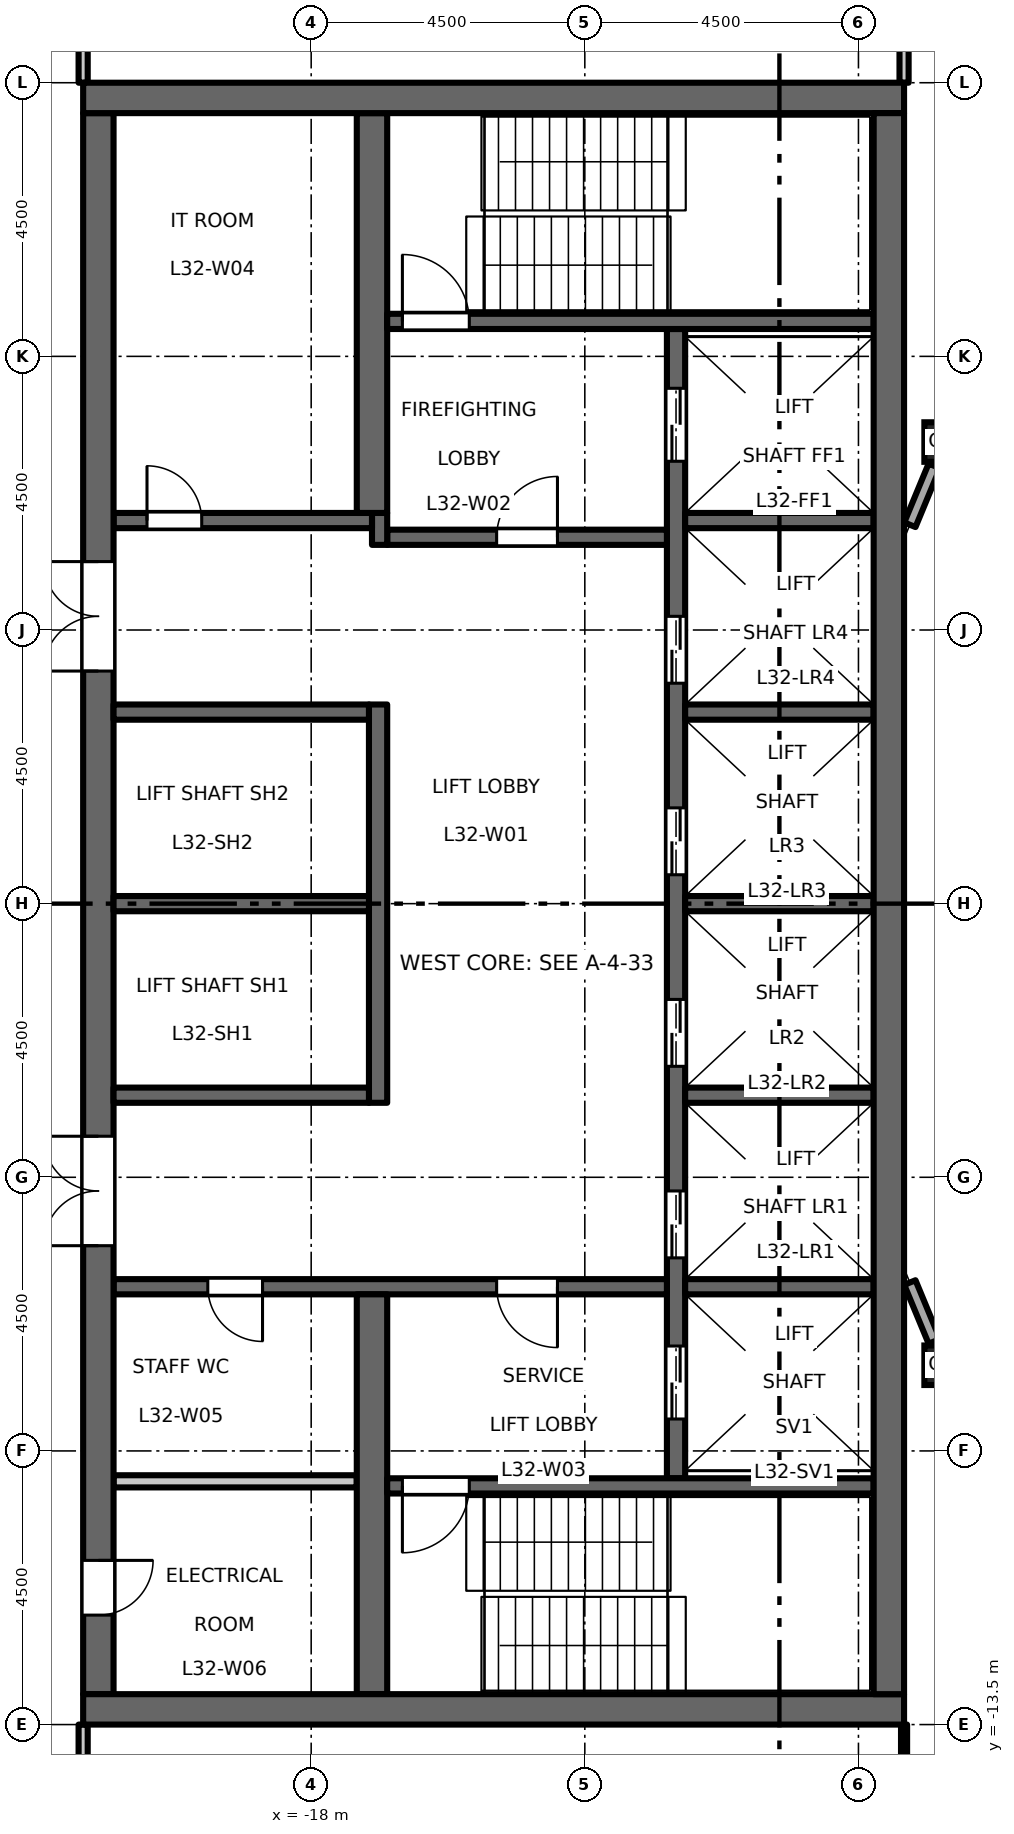
"""IFC4 building model, lengths in metres.
Left out: names, types, materials, properties, quantities, classifications, styles, units other than length and angle.
Written with IfcOpenShell. Run it as: python <this file> out.ifc"""

import sys

from ifc_helpers import new_model, si_unit, direction, frame, frame_2d, origin, origin_2d, place, context, subcontext, project, spatial, rectangle, hollow_rectangle, extrude, element, fill, save


model = new_model("IFC4")
c1 = context("Model", 3, precision=1e-05, world=origin(), true_north=direction((0.0, 1.0)))
c2 = subcontext(c1, "Body", "Model", "MODEL_VIEW")
j1 = project(units=[si_unit("LENGTHUNIT", "METRE"), si_unit("PLANEANGLEUNIT", "RADIAN")], contexts=[c1])
p1 = place(None, origin())
s1 = spatial("IfcSite", under=j1, at=p1, CompositionType="ELEMENT")
p2 = place(p1, origin())
s2 = spatial("IfcBuilding", under=s1, at=p2, CompositionType="ELEMENT")
p3 = place(p2, frame((0.0, 0.0, 149.7)))
s3 = spatial("IfcBuildingStorey", under=s2, at=p3, CompositionType="ELEMENT", Elevation=149.7)
for number, where, z_axis, x_axis in (
    (1, (-7.591, -7.591, 0.0), (0.0, 0.0, 1.0), (1.0, 0.0, 0.0)),
    (2, (-7.591, 7.591, 0.0), (0.0, 0.0, 1.0), (1.0, 0.0, 0.0)),
):
    element("IfcColumn", number, at=place(p3, frame(where, z_axis=z_axis, x_axis=x_axis)), inside=s3, PredefinedType="COLUMN", context=c2, shape_type="SweptSolid", body=[
        extrude(hollow_rectangle(XDim=0.65, YDim=0.65, WallThickness=0.036, at=origin_2d()), origin(), (0.0, 0.0, 1.0), 4.5),
    ])
p4 = place(p3, frame((-12.0, -9.45, 0.0), z_axis=(0.0, 0.0, 1.0), x_axis=(0.0, 1.0, 0.0)))
e3 = element("IfcWall", 3, at=p4, inside=s3, PredefinedType="SHEAR", context=c2, shape_type="SweptSolid", body=[
    extrude(rectangle(XDim=18.9, YDim=0.3, at=frame_2d((9.45, 0.0))), origin(), (0.0, 0.0, 1.0), 4.35),
])
p5 = place(p4, frame((3.625, 0.0, 0.0)))
e4 = element("IfcOpeningElement", 4, at=p5, cuts=e3, PredefinedType="OPENING", context=c2, shape_type="SweptSolid", body=[
    extrude(rectangle(XDim=1.1, YDim=2.1, at=frame_2d((0.55, 1.05))), frame((0.0, 0.16, 0.0), z_axis=(0.0, -1.0, 0.0), x_axis=(1.0, 0.0, 0.0)), (0.0, 0.0, 1.0), 0.32),
])
p6 = place(p4, frame((6.775, 0.0, 0.0)))
e5 = element("IfcOpeningElement", 5, at=p6, cuts=e3, PredefinedType="OPENING", context=c2, shape_type="SweptSolid", body=[
    extrude(rectangle(XDim=1.1, YDim=2.1, at=frame_2d((0.55, 1.05))), frame((0.0, 0.16, 0.0), z_axis=(0.0, -1.0, 0.0), x_axis=(1.0, 0.0, 0.0)), (0.0, 0.0, 1.0), 0.32),
])
p7 = place(p4, frame((9.925, 0.0, 0.0)))
e6 = element("IfcOpeningElement", 6, at=p7, cuts=e3, PredefinedType="OPENING", context=c2, shape_type="SweptSolid", body=[
    extrude(rectangle(XDim=1.1, YDim=2.1, at=frame_2d((0.55, 1.05))), frame((0.0, 0.16, 0.0), z_axis=(0.0, -1.0, 0.0), x_axis=(1.0, 0.0, 0.0)), (0.0, 0.0, 1.0), 0.32),
])
p8 = place(p4, frame((13.075, 0.0, 0.0)))
e7 = element("IfcOpeningElement", 7, at=p8, cuts=e3, PredefinedType="OPENING", context=c2, shape_type="SweptSolid", body=[
    extrude(rectangle(XDim=1.1, YDim=2.1, at=frame_2d((0.55, 1.05))), frame((0.0, 0.16, 0.0), z_axis=(0.0, -1.0, 0.0), x_axis=(1.0, 0.0, 0.0)), (0.0, 0.0, 1.0), 0.32),
])
p9 = place(p4, frame((16.725, 0.0, 0.0)))
e8 = element("IfcOpeningElement", 8, at=p9, cuts=e3, PredefinedType="OPENING", context=c2, shape_type="SweptSolid", body=[
    extrude(rectangle(XDim=1.2, YDim=2.1, at=frame_2d((0.6, 1.05))), frame((0.0, 0.16, 0.0), z_axis=(0.0, -1.0, 0.0), x_axis=(1.0, 0.0, 0.0)), (0.0, 0.0, 1.0), 0.32),
])
p10 = place(p4, frame((0.975, 0.0, 0.0)))
e9 = element("IfcOpeningElement", 9, at=p10, cuts=e3, PredefinedType="OPENING", context=c2, shape_type="SweptSolid", body=[
    extrude(rectangle(XDim=1.2, YDim=2.1, at=frame_2d((0.6, 1.05))), frame((0.0, 0.16, 0.0), z_axis=(0.0, -1.0, 0.0), x_axis=(1.0, 0.0, 0.0)), (0.0, 0.0, 1.0), 0.32),
])
p11 = place(p3, frame((-12.15, 6.025, 0.0), z_axis=(0.0, 0.0, 1.0), x_axis=(-1.0, 0.0, 0.0)))
e10 = element("IfcWall", 10, at=p11, inside=s3, PredefinedType="SHEAR", context=c2, shape_type="SweptSolid", body=[
    extrude(rectangle(XDim=4.6, YDim=0.25, at=frame_2d((2.3, 0.0))), origin(), (0.0, 0.0, 1.0), 4.35),
])
p12 = place(p11, frame((1.8, 0.0, 0.0)))
e11 = element("IfcOpeningElement", 11, at=p12, cuts=e10, PredefinedType="OPENING", context=c2, shape_type="SweptSolid", body=[
    extrude(rectangle(XDim=1.0, YDim=2.1, at=frame_2d((0.5, 1.05))), frame((0.0, 0.135, 0.0), z_axis=(0.0, -1.0, 0.0), x_axis=(1.0, 0.0, 0.0)), (0.0, 0.0, 1.0), 0.27),
])
p13 = place(p3, frame((-16.875, 5.9, 0.0), z_axis=(0.0, 0.0, 1.0), x_axis=(0.0, 1.0, 0.0)))
e12 = element("IfcWall", 12, at=p13, inside=s3, PredefinedType="SHEAR", context=c2, shape_type="SweptSolid", body=[
    extrude(rectangle(XDim=0.525, YDim=0.25, at=frame_2d((0.263, 0.0))), origin(), (0.0, 0.0, 1.0), 4.35),
])
p14 = place(p3, frame((-17.0, 6.3, 0.0), z_axis=(0.0, 0.0, 1.0), x_axis=(-1.0, 0.0, 0.0)))
e13 = element("IfcWall", 13, at=p14, inside=s3, PredefinedType="SHEAR", context=c2, shape_type="SweptSolid", body=[
    extrude(rectangle(XDim=4.25, YDim=0.25, at=frame_2d((2.125, 0.0))), origin(), (0.0, 0.0, 1.0), 4.35),
])
p15 = place(p14, frame((2.8, 0.0, 0.0)))
e14 = element("IfcOpeningElement", 14, at=p15, cuts=e13, PredefinedType="OPENING", context=c2, shape_type="SweptSolid", body=[
    extrude(rectangle(XDim=0.9, YDim=2.1, at=frame_2d((0.45, 1.05))), frame((0.0, 0.135, 0.0), z_axis=(0.0, -1.0, 0.0), x_axis=(1.0, 0.0, 0.0)), (0.0, 0.0, 1.0), 0.27),
])
p16 = place(p3, frame((-12.15, -6.3, 0.0), z_axis=(0.0, 0.0, 1.0), x_axis=(-1.0, 0.0, 0.0)))
e15 = element("IfcWall", 15, at=p16, inside=s3, PredefinedType="SHEAR", context=c2, shape_type="SweptSolid", body=[
    extrude(rectangle(XDim=9.1, YDim=0.25, at=frame_2d((4.55, 0.0))), origin(), (0.0, 0.0, 1.0), 4.35),
])
p17 = place(p16, frame((1.8, 0.0, 0.0)))
e16 = element("IfcOpeningElement", 16, at=p17, cuts=e15, PredefinedType="OPENING", context=c2, shape_type="SweptSolid", body=[
    extrude(rectangle(XDim=1.0, YDim=2.1, at=frame_2d((0.5, 1.05))), frame((0.0, 0.135, 0.0), z_axis=(0.0, -1.0, 0.0), x_axis=(1.0, 0.0, 0.0)), (0.0, 0.0, 1.0), 0.27),
])
p18 = place(p16, frame((6.65, 0.0, 0.0)))
e17 = element("IfcOpeningElement", 17, at=p18, cuts=e15, PredefinedType="OPENING", context=c2, shape_type="SweptSolid", body=[
    extrude(rectangle(XDim=0.9, YDim=2.1, at=frame_2d((0.45, 1.05))), frame((0.0, 0.135, 0.0), z_axis=(0.0, -1.0, 0.0), x_axis=(1.0, 0.0, 0.0)), (0.0, 0.0, 1.0), 0.27),
])
p19 = place(p3, frame((-21.5, -13.0, 0.0), z_axis=(0.0, 0.0, 1.0), x_axis=(0.0, 1.0, 0.0)))
e18 = element("IfcWall", 18, at=p19, inside=s3, PredefinedType="SHEAR", context=c2, shape_type="SweptSolid", body=[
    extrude(rectangle(XDim=26.0, YDim=0.5, at=frame_2d((13.0, 0.0))), origin(), (0.0, 0.0, 1.0), 4.35),
])
p20 = place(p19, frame((16.825, 0.0, 0.0)))
e19 = element("IfcOpeningElement", 19, at=p20, cuts=e18, PredefinedType="OPENING", context=c2, shape_type="SweptSolid", body=[
    extrude(rectangle(XDim=1.8, YDim=2.1, at=frame_2d((0.9, 1.05))), frame((0.0, 0.26, 0.0), z_axis=(0.0, -1.0, 0.0), x_axis=(1.0, 0.0, 0.0)), (0.0, 0.0, 1.0), 0.52),
])
p21 = place(p19, frame((7.375, 0.0, 0.0)))
e20 = element("IfcOpeningElement", 20, at=p21, cuts=e18, PredefinedType="OPENING", context=c2, shape_type="SweptSolid", body=[
    extrude(rectangle(XDim=1.8, YDim=2.1, at=frame_2d((0.9, 1.05))), frame((0.0, 0.26, 0.0), z_axis=(0.0, -1.0, 0.0), x_axis=(1.0, 0.0, 0.0)), (0.0, 0.0, 1.0), 0.52),
])
p22 = place(p19, frame((1.3, 0.0, 0.0)))
e21 = element("IfcOpeningElement", 21, at=p22, cuts=e18, PredefinedType="OPENING", context=c2, shape_type="SweptSolid", body=[
    extrude(rectangle(XDim=0.9, YDim=2.1, at=frame_2d((0.45, 1.05))), frame((0.0, 0.26, 0.0), z_axis=(0.0, -1.0, 0.0), x_axis=(1.0, 0.0, 0.0)), (0.0, 0.0, 1.0), 0.52),
])
p23 = place(p3, frame((-17.25, -9.5, 0.0), z_axis=(0.0, 0.0, 1.0), x_axis=(-1.0, 0.0, 0.0)))
e22 = element("IfcWall", 22, at=p23, inside=s3, PredefinedType="PARTITIONING", context=c2, shape_type="SweptSolid", body=[
    extrude(rectangle(XDim=4.0, YDim=0.2, at=frame_2d((2.0, 0.0))), origin(), (0.0, 0.0, 1.0), 4.35),
])
p24 = place(p3, frame((-16.9, -3.275, 0.0), z_axis=(0.0, 0.0, 1.0), x_axis=(0.0, 1.0, 0.0)))
e23 = element("IfcWall", 23, at=p24, inside=s3, PredefinedType="SHEAR", context=c2, shape_type="SweptSolid", body=[
    extrude(rectangle(XDim=6.55, YDim=0.3, at=frame_2d((3.275, 0.0))), origin(), (0.0, 0.0, 1.0), 4.35),
])
for number, where, z_axis, x_axis in (
    (24, (-17.05, 0.0, 0.0), (0.0, 0.0, 1.0), (-1.0, 0.0, 0.0)),
    (25, (-17.05, 3.15, 0.0), (0.0, 0.0, 1.0), (-1.0, 0.0, 0.0)),
    (26, (-17.05, -3.15, 0.0), (0.0, 0.0, 1.0), (-1.0, 0.0, 0.0)),
):
    element("IfcWall", number, at=place(p3, frame(where, z_axis=z_axis, x_axis=x_axis)), inside=s3, PredefinedType="SHEAR", context=c2, shape_type="SweptSolid", body=[
        extrude(rectangle(XDim=4.2, YDim=0.25, at=frame_2d((2.1, 0.0))), origin(), (0.0, 0.0, 1.0), 4.35),
    ])
for number, where, z_axis, x_axis in (
    (27, (-17.0, 6.425, 0.0), (0.0, 0.0, 1.0), (0.0, 1.0, 0.0)),
    (28, (-17.0, -13.0, 0.0), (0.0, 0.0, 1.0), (0.0, 1.0, 0.0)),
):
    element("IfcWall", number, at=place(p3, frame(where, z_axis=z_axis, x_axis=x_axis)), inside=s3, PredefinedType="SHEAR", context=c2, shape_type="SweptSolid", body=[
        extrude(rectangle(XDim=6.575, YDim=0.5, at=frame_2d((3.288, 0.0))), origin(), (0.0, 0.0, 1.0), 4.35),
    ])
for number, where, z_axis, x_axis in (
    (29, (-8.75, 0.0, 0.0), (0.0, 0.0, 1.0), (-1.0, 0.0, 0.0)),
    (30, (-8.75, 3.15, 0.0), (0.0, 0.0, 1.0), (-1.0, 0.0, 0.0)),
    (31, (-8.75, 6.3, 0.0), (0.0, 0.0, 1.0), (-1.0, 0.0, 0.0)),
    (32, (-8.75, -3.15, 0.0), (0.0, 0.0, 1.0), (-1.0, 0.0, 0.0)),
    (33, (-8.75, -6.3, 0.0), (0.0, 0.0, 1.0), (-1.0, 0.0, 0.0)),
):
    element("IfcWall", number, at=place(p3, frame(where, z_axis=z_axis, x_axis=x_axis)), inside=s3, PredefinedType="SHEAR", context=c2, shape_type="SweptSolid", body=[
        extrude(rectangle(XDim=3.1, YDim=0.25, at=frame_2d((1.55, 0.0))), origin(), (0.0, 0.0, 1.0), 4.35),
    ])
p25 = place(p3, frame((-8.75, 9.575, 0.0), z_axis=(0.0, 0.0, 1.0), x_axis=(-1.0, 0.0, 0.0)))
e34 = element("IfcWall", 34, at=p25, inside=s3, PredefinedType="SHEAR", context=c2, shape_type="SweptSolid", body=[
    extrude(rectangle(XDim=8.0, YDim=0.25, at=frame_2d((4.0, 0.0))), origin(), (0.0, 0.0, 1.0), 4.35),
])
p26 = place(p25, frame((6.65, 0.0, 0.0)))
e35 = element("IfcOpeningElement", 35, at=p26, cuts=e34, PredefinedType="OPENING", context=c2, shape_type="SweptSolid", body=[
    extrude(rectangle(XDim=1.1, YDim=2.1, at=frame_2d((0.55, 1.05))), frame((0.0, 0.135, 0.0), z_axis=(0.0, -1.0, 0.0), x_axis=(1.0, 0.0, 0.0)), (0.0, 0.0, 1.0), 0.27),
])
p27 = place(p3, frame((-8.75, -9.575, 0.0), z_axis=(0.0, 0.0, 1.0), x_axis=(-1.0, 0.0, 0.0)))
e36 = element("IfcWall", 36, at=p27, inside=s3, PredefinedType="SHEAR", context=c2, shape_type="SweptSolid", body=[
    extrude(rectangle(XDim=8.0, YDim=0.25, at=frame_2d((4.0, 0.0))), origin(), (0.0, 0.0, 1.0), 4.35),
])
p28 = place(p27, frame((6.65, 0.0, 0.0)))
e37 = element("IfcOpeningElement", 37, at=p28, cuts=e36, PredefinedType="OPENING", context=c2, shape_type="SweptSolid", body=[
    extrude(rectangle(XDim=1.1, YDim=2.1, at=frame_2d((0.55, 1.05))), frame((0.0, 0.135, 0.0), z_axis=(0.0, -1.0, 0.0), x_axis=(1.0, 0.0, 0.0)), (0.0, 0.0, 1.0), 0.27),
])
for number, where, z_axis, x_axis in (
    (38, (-8.25, 13.25, 0.0), (0.0, 0.0, 1.0), (-1.0, 0.0, 0.0)),
    (39, (-8.25, -13.25, 0.0), (0.0, 0.0, 1.0), (-1.0, 0.0, 0.0)),
):
    element("IfcWall", number, at=place(p3, frame(where, z_axis=z_axis, x_axis=x_axis)), inside=s3, PredefinedType="SHEAR", context=c2, shape_type="SweptSolid", body=[
        extrude(rectangle(XDim=13.5, YDim=0.5, at=frame_2d((6.75, 0.0))), origin(), (0.0, 0.0, 1.0), 4.35),
    ])
p29 = place(p3, frame((-8.5, -13.0, 0.0), z_axis=(0.0, 0.0, 1.0), x_axis=(0.0, 1.0, 0.0)))
e40 = element("IfcWall", 40, at=p29, inside=s3, PredefinedType="SHEAR", context=c2, shape_type="SweptSolid", body=[
    extrude(rectangle(XDim=26.0, YDim=0.5, at=frame_2d((13.0, 0.0))), origin(), (0.0, 0.0, 1.0), 4.35),
])
for number, where, z_axis, x_axis in (
    (41, (-7.753, 7.199, 0.0), (0.0, 0.0, 1.0), (-0.383, -0.924, 0.0)),
    (42, (-8.154, -6.231, 0.0), (0.0, 0.0, 1.0), (0.383, -0.924, 0.0)),
):
    element("IfcWall", number, at=place(p3, frame(where, z_axis=z_axis, x_axis=x_axis)), inside=s3, PredefinedType="STANDARD", context=c2, shape_type="SweptSolid", body=[
        extrude(rectangle(XDim=1.048, YDim=0.2, at=frame_2d((0.524, 0.0))), origin(), (0.0, 0.0, 1.0), 3.826),
    ])
for number, where, z_axis, x_axis in (
    (43, (-21.75, -16.925, 0.0), (0.0, 0.0, 1.0), (0.0, 1.0, 0.0)),
    (44, (-21.75, 13.5, 0.0), (0.0, 0.0, 1.0), (0.0, 1.0, 0.0)),
):
    element("IfcWall", number, at=place(p3, frame(where, z_axis=z_axis, x_axis=x_axis)), inside=s3, PredefinedType="PARTITIONING", context=c2, shape_type="SweptSolid", body=[
        extrude(rectangle(XDim=3.425, YDim=0.15, at=frame_2d((1.712, 0.0))), origin(), (0.0, 0.0, 1.0), 4.35),
    ])
p30 = place(p3, frame((-8.25, -16.925, 0.0), z_axis=(0.0, 0.0, 1.0), x_axis=(0.0, 1.0, 0.0)))
e45 = element("IfcWall", 45, at=p30, inside=s3, PredefinedType="PARTITIONING", context=c2, shape_type="SweptSolid", body=[
    extrude(rectangle(XDim=3.425, YDim=0.1, at=frame_2d((1.712, 0.0))), origin(), (0.0, 0.0, 1.0), 4.35),
])
p31 = place(p3, frame((-8.25, 13.5, 0.0), z_axis=(0.0, 0.0, 1.0), x_axis=(0.0, 1.0, 0.0)))
e46 = element("IfcWall", 46, at=p31, inside=s3, PredefinedType="PARTITIONING", context=c2, shape_type="SweptSolid", body=[
    extrude(rectangle(XDim=3.425, YDim=0.15, at=frame_2d((1.712, 0.0))), origin(), (0.0, 0.0, 1.0), 4.35),
])
p32 = place(p12, origin())
e47 = element("IfcDoor", 47, at=p32, inside=s3, OperationType="SINGLE_SWING_LEFT", PredefinedType="DOOR", context=c2, shape_type="SweptSolid", body=[
    extrude(rectangle(XDim=1.0, YDim=2.1, at=frame_2d((0.5, 1.05))), frame((0.0, 0.025, 0.0), z_axis=(0.0, -1.0, 0.0), x_axis=(1.0, 0.0, 0.0)), (0.0, 0.0, 1.0), 0.05),
])
fill(e11, e47)
p33 = place(p17, origin())
e48 = element("IfcDoor", 48, at=p33, inside=s3, OperationType="SINGLE_SWING_RIGHT", PredefinedType="DOOR", context=c2, shape_type="SweptSolid", body=[
    extrude(rectangle(XDim=1.0, YDim=2.1, at=frame_2d((0.5, 1.05))), frame((0.0, 0.025, 0.0), z_axis=(0.0, -1.0, 0.0), x_axis=(1.0, 0.0, 0.0)), (0.0, 0.0, 1.0), 0.05),
])
fill(e16, e48)
p34 = place(p26, origin())
e49 = element("IfcDoor", 49, at=p34, inside=s3, OperationType="SINGLE_SWING_RIGHT", PredefinedType="DOOR", context=c2, shape_type="SweptSolid", body=[
    extrude(rectangle(XDim=1.1, YDim=2.1, at=frame_2d((0.55, 1.05))), frame((0.0, 0.025, 0.0), z_axis=(0.0, -1.0, 0.0), x_axis=(1.0, 0.0, 0.0)), (0.0, 0.0, 1.0), 0.05),
])
fill(e35, e49)
p35 = place(p28, origin())
e50 = element("IfcDoor", 50, at=p35, inside=s3, OperationType="SINGLE_SWING_LEFT", PredefinedType="DOOR", context=c2, shape_type="SweptSolid", body=[
    extrude(rectangle(XDim=1.1, YDim=2.1, at=frame_2d((0.55, 1.05))), frame((0.0, 0.025, 0.0), z_axis=(0.0, -1.0, 0.0), x_axis=(1.0, 0.0, 0.0)), (0.0, 0.0, 1.0), 0.05),
])
fill(e37, e50)
p36 = place(p20, origin())
e51 = element("IfcDoor", 51, at=p36, inside=s3, OperationType="DOUBLE_DOOR_DOUBLE_SWING", PredefinedType="DOOR", context=c2, shape_type="SweptSolid", body=[
    extrude(rectangle(XDim=1.8, YDim=2.1, at=frame_2d((0.9, 1.05))), frame((0.0, 0.025, 0.0), z_axis=(0.0, -1.0, 0.0), x_axis=(1.0, 0.0, 0.0)), (0.0, 0.0, 1.0), 0.05),
])
fill(e19, e51)
p37 = place(p21, origin())
e52 = element("IfcDoor", 52, at=p37, inside=s3, OperationType="DOUBLE_DOOR_DOUBLE_SWING", PredefinedType="DOOR", context=c2, shape_type="SweptSolid", body=[
    extrude(rectangle(XDim=1.8, YDim=2.1, at=frame_2d((0.9, 1.05))), frame((0.0, 0.025, 0.0), z_axis=(0.0, -1.0, 0.0), x_axis=(1.0, 0.0, 0.0)), (0.0, 0.0, 1.0), 0.05),
])
fill(e20, e52)
p38 = place(p5, origin())
e53 = element("IfcDoor", 53, at=p38, inside=s3, OperationType="DOUBLE_DOOR_SLIDING", PredefinedType="DOOR", context=c2, shape_type="SweptSolid", body=[
    extrude(rectangle(XDim=1.1, YDim=2.1, at=frame_2d((0.55, 1.05))), frame((0.0, 0.025, 0.0), z_axis=(0.0, -1.0, 0.0), x_axis=(1.0, 0.0, 0.0)), (0.0, 0.0, 1.0), 0.05),
])
fill(e4, e53)
p39 = place(p6, origin())
e54 = element("IfcDoor", 54, at=p39, inside=s3, OperationType="DOUBLE_DOOR_SLIDING", PredefinedType="DOOR", context=c2, shape_type="SweptSolid", body=[
    extrude(rectangle(XDim=1.1, YDim=2.1, at=frame_2d((0.55, 1.05))), frame((0.0, 0.025, 0.0), z_axis=(0.0, -1.0, 0.0), x_axis=(1.0, 0.0, 0.0)), (0.0, 0.0, 1.0), 0.05),
])
fill(e5, e54)
p40 = place(p7, origin())
e55 = element("IfcDoor", 55, at=p40, inside=s3, OperationType="DOUBLE_DOOR_SLIDING", PredefinedType="DOOR", context=c2, shape_type="SweptSolid", body=[
    extrude(rectangle(XDim=1.1, YDim=2.1, at=frame_2d((0.55, 1.05))), frame((0.0, 0.025, 0.0), z_axis=(0.0, -1.0, 0.0), x_axis=(1.0, 0.0, 0.0)), (0.0, 0.0, 1.0), 0.05),
])
fill(e6, e55)
p41 = place(p8, origin())
e56 = element("IfcDoor", 56, at=p41, inside=s3, OperationType="DOUBLE_DOOR_SLIDING", PredefinedType="DOOR", context=c2, shape_type="SweptSolid", body=[
    extrude(rectangle(XDim=1.1, YDim=2.1, at=frame_2d((0.55, 1.05))), frame((0.0, 0.025, 0.0), z_axis=(0.0, -1.0, 0.0), x_axis=(1.0, 0.0, 0.0)), (0.0, 0.0, 1.0), 0.05),
])
fill(e7, e56)
p42 = place(p9, origin())
e57 = element("IfcDoor", 57, at=p42, inside=s3, OperationType="DOUBLE_DOOR_SLIDING", PredefinedType="DOOR", context=c2, shape_type="SweptSolid", body=[
    extrude(rectangle(XDim=1.2, YDim=2.1, at=frame_2d((0.6, 1.05))), frame((0.0, 0.025, 0.0), z_axis=(0.0, -1.0, 0.0), x_axis=(1.0, 0.0, 0.0)), (0.0, 0.0, 1.0), 0.05),
])
fill(e8, e57)
p43 = place(p10, origin())
e58 = element("IfcDoor", 58, at=p43, inside=s3, OperationType="DOUBLE_DOOR_SLIDING", PredefinedType="DOOR", context=c2, shape_type="SweptSolid", body=[
    extrude(rectangle(XDim=1.2, YDim=2.1, at=frame_2d((0.6, 1.05))), frame((0.0, 0.025, 0.0), z_axis=(0.0, -1.0, 0.0), x_axis=(1.0, 0.0, 0.0)), (0.0, 0.0, 1.0), 0.05),
])
fill(e9, e58)
p44 = place(p15, origin())
e59 = element("IfcDoor", 59, at=p44, inside=s3, OperationType="SINGLE_SWING_RIGHT", PredefinedType="DOOR", context=c2, shape_type="SweptSolid", body=[
    extrude(rectangle(XDim=0.9, YDim=2.1, at=frame_2d((0.45, 1.05))), frame((0.0, 0.025, 0.0), z_axis=(0.0, -1.0, 0.0), x_axis=(1.0, 0.0, 0.0)), (0.0, 0.0, 1.0), 0.05),
])
fill(e14, e59)
p45 = place(p18, origin())
e60 = element("IfcDoor", 60, at=p45, inside=s3, OperationType="SINGLE_SWING_RIGHT", PredefinedType="DOOR", context=c2, shape_type="SweptSolid", body=[
    extrude(rectangle(XDim=0.9, YDim=2.1, at=frame_2d((0.45, 1.05))), frame((0.0, 0.025, 0.0), z_axis=(0.0, -1.0, 0.0), x_axis=(1.0, 0.0, 0.0)), (0.0, 0.0, 1.0), 0.05),
])
fill(e17, e60)
p46 = place(p22, origin())
e61 = element("IfcDoor", 61, at=p46, inside=s3, OperationType="SINGLE_SWING_RIGHT", PredefinedType="DOOR", context=c2, shape_type="SweptSolid", body=[
    extrude(rectangle(XDim=0.9, YDim=2.1, at=frame_2d((0.45, 1.05))), frame((0.0, 0.025, 0.0), z_axis=(0.0, -1.0, 0.0), x_axis=(1.0, 0.0, 0.0)), (0.0, 0.0, 1.0), 0.05),
])
fill(e21, e61)
save(model, sys.argv[1])
